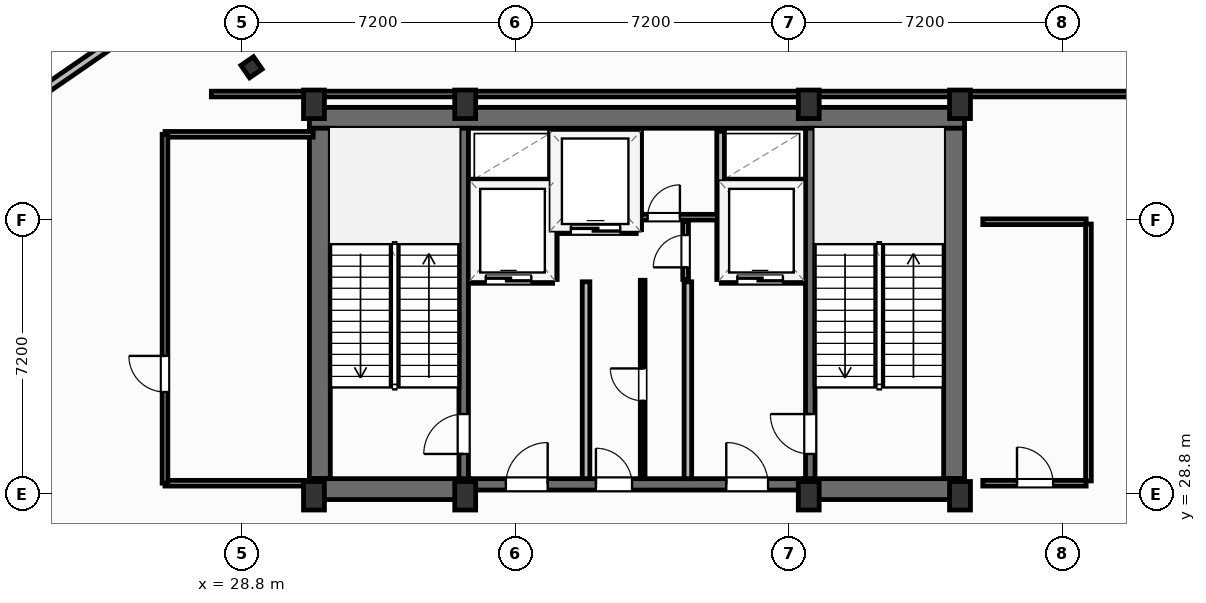
"""IFC4 building model, lengths in metres.
Left out: names, types, materials, properties, quantities, classifications, styles, units other than length and angle.
Written with IfcOpenShell. Run it as: python <this file> out.ifc"""

import sys

from ifc_helpers import new_model, si_unit, direction, frame, frame_2d, origin, origin_2d, place, context, subcontext, project, spatial, rectangle, i_section, extrude, element, fill, save


model = new_model("IFC4")
c1 = context("Model", 3, precision=1e-05, world=origin(), true_north=direction((0.0, 1.0)))
c2 = subcontext(c1, "Body", "Model", "MODEL_VIEW")
j1 = project(units=[si_unit("LENGTHUNIT", "METRE"), si_unit("PLANEANGLEUNIT", "RADIAN")], contexts=[c1])
p1 = place(None, origin())
s1 = spatial("IfcSite", under=j1, at=p1, CompositionType="ELEMENT")
p2 = place(p1, origin())
s2 = spatial("IfcBuilding", under=s1, at=p2, CompositionType="ELEMENT")
p3 = place(p2, frame((0.0, 0.0, 291.5)))
s3 = spatial("IfcBuildingStorey", under=s2, at=p3, CompositionType="ELEMENT", Elevation=291.5)
for number, where, z_axis, x_axis in (
    (1, (30.7, 28.75, 0.0), (0.0, 0.0, 1.0), (1.0, 0.0, 0.0)),
    (2, (34.68, 28.75, 0.0), (0.0, 0.0, 1.0), (1.0, 0.0, 0.0)),
    (3, (43.72, 28.75, 0.0), (0.0, 0.0, 1.0), (1.0, 0.0, 0.0)),
    (4, (47.7, 28.75, 0.0), (0.0, 0.0, 1.0), (1.0, 0.0, 0.0)),
    (5, (30.7, 39.05, 0.0), (0.0, 0.0, 1.0), (1.0, 0.0, 0.0)),
    (6, (34.68, 39.05, 0.0), (0.0, 0.0, 1.0), (1.0, 0.0, 0.0)),
    (7, (43.72, 39.05, 0.0), (0.0, 0.0, 1.0), (1.0, 0.0, 0.0)),
    (8, (47.7, 39.05, 0.0), (0.0, 0.0, 1.0), (1.0, 0.0, 0.0)),
):
    element("IfcColumn", number, at=place(p3, frame(where, z_axis=z_axis, x_axis=x_axis)), inside=s3, PredefinedType="COLUMN", context=c2, shape_type="SweptSolid", body=[
        extrude(rectangle(XDim=0.55, YDim=0.75, at=origin_2d()), origin(), (0.0, 0.0, 1.0), 4.8),
    ])
p4 = place(p3, frame((30.58, 38.695, 0.0), z_axis=(0.0, 0.0, 1.0), x_axis=(1.0, 0.0, 0.0)))
e9 = element("IfcWall", 9, at=p4, inside=s3, PredefinedType="SHEAR", context=c2, shape_type="SweptSolid", body=[
    extrude(rectangle(XDim=17.24, YDim=0.55, at=frame_2d((8.62, 0.0))), origin(), (0.0, 0.0, 1.0), 4.48),
])
for number, where, z_axis, x_axis in (
    (10, (30.855, 29.2, 0.0), (0.0, 0.0, 1.0), (0.0, 1.0, 0.0)),
    (11, (47.545, 29.2, 0.0), (0.0, 0.0, 1.0), (0.0, 1.0, 0.0)),
):
    element("IfcWall", number, at=place(p3, frame(where, z_axis=z_axis, x_axis=x_axis)), inside=s3, PredefinedType="SHEAR", context=c2, shape_type="SweptSolid", body=[
        extrude(rectangle(XDim=9.22, YDim=0.55, at=frame_2d((4.61, 0.0))), origin(), (0.0, 0.0, 1.0), 4.48),
    ])
for number, where, z_axis, x_axis in (
    (12, (30.58, 28.925, 0.0), (0.0, 0.0, 1.0), (1.0, 0.0, 0.0)),
    (13, (43.6, 28.925, 0.0), (0.0, 0.0, 1.0), (1.0, 0.0, 0.0)),
):
    element("IfcWall", number, at=place(p3, frame(where, z_axis=z_axis, x_axis=x_axis)), inside=s3, PredefinedType="SHEAR", context=c2, shape_type="SweptSolid", body=[
        extrude(rectangle(XDim=4.22, YDim=0.55, at=frame_2d((2.11, 0.0))), origin(), (0.0, 0.0, 1.0), 4.48),
    ])
p5 = place(p3, frame((34.8, 29.05, 0.0), z_axis=(0.0, 0.0, 1.0), x_axis=(1.0, 0.0, 0.0)))
e14 = element("IfcWall", 14, at=p5, inside=s3, PredefinedType="SHEAR", context=c2, shape_type="SweptSolid", body=[
    extrude(rectangle(XDim=8.8, YDim=0.3, at=frame_2d((4.4, 0.0))), origin(), (0.0, 0.0, 1.0), 4.48),
])
p6 = place(p5, frame((0.95, 0.0, 0.0)))
e15 = element("IfcOpeningElement", 15, at=p6, cuts=e14, PredefinedType="OPENING", context=c2, shape_type="SweptSolid", body=[
    extrude(rectangle(XDim=1.1, YDim=2.15, at=frame_2d((0.55, 1.075))), frame((0.0, 0.16, 0.0), z_axis=(0.0, -1.0, 0.0), x_axis=(1.0, 0.0, 0.0)), (0.0, 0.0, 1.0), 0.32),
])
p7 = place(p5, frame((6.75, 0.0, 0.0)))
e16 = element("IfcOpeningElement", 16, at=p7, cuts=e14, PredefinedType="OPENING", context=c2, shape_type="SweptSolid", body=[
    extrude(rectangle(XDim=1.1, YDim=2.15, at=frame_2d((0.55, 1.075))), frame((0.0, 0.16, 0.0), z_axis=(0.0, -1.0, 0.0), x_axis=(1.0, 0.0, 0.0)), (0.0, 0.0, 1.0), 0.32),
])
p8 = place(p5, frame((3.32, 0.0, 0.0)))
e17 = element("IfcOpeningElement", 17, at=p8, cuts=e14, PredefinedType="OPENING", context=c2, shape_type="SweptSolid", body=[
    extrude(rectangle(XDim=0.95, YDim=2.15, at=frame_2d((0.475, 1.075))), frame((0.0, 0.16, 0.0), z_axis=(0.0, -1.0, 0.0), x_axis=(1.0, 0.0, 0.0)), (0.0, 0.0, 1.0), 0.32),
])
p9 = place(p3, frame((34.64, 29.2, 0.0), z_axis=(0.0, 0.0, 1.0), x_axis=(0.0, 1.0, 0.0)))
e18 = element("IfcWall", 18, at=p9, inside=s3, PredefinedType="SHEAR", context=c2, shape_type="SweptSolid", body=[
    extrude(rectangle(XDim=9.22, YDim=0.25, at=frame_2d((4.61, 0.0))), origin(), (0.0, 0.0, 1.0), 4.48),
])
p10 = place(p9, frame((0.65, 0.0, 0.0)))
e19 = element("IfcOpeningElement", 19, at=p10, cuts=e18, PredefinedType="OPENING", context=c2, shape_type="SweptSolid", body=[
    extrude(rectangle(XDim=1.05, YDim=2.15, at=frame_2d((0.525, 1.075))), frame((0.0, 0.135, 0.0), z_axis=(0.0, -1.0, 0.0), x_axis=(1.0, 0.0, 0.0)), (0.0, 0.0, 1.0), 0.27),
])
p11 = place(p3, frame((43.76, 29.2, 0.0), z_axis=(0.0, 0.0, 1.0), x_axis=(0.0, 1.0, 0.0)))
e20 = element("IfcWall", 20, at=p11, inside=s3, PredefinedType="SHEAR", context=c2, shape_type="SweptSolid", body=[
    extrude(rectangle(XDim=9.22, YDim=0.25, at=frame_2d((4.61, 0.0))), origin(), (0.0, 0.0, 1.0), 4.48),
])
p12 = place(p11, frame((0.65, 0.0, 0.0)))
e21 = element("IfcOpeningElement", 21, at=p12, cuts=e20, PredefinedType="OPENING", context=c2, shape_type="SweptSolid", body=[
    extrude(rectangle(XDim=1.05, YDim=2.15, at=frame_2d((0.525, 1.075))), frame((0.0, 0.135, 0.0), z_axis=(0.0, -1.0, 0.0), x_axis=(1.0, 0.0, 0.0)), (0.0, 0.0, 1.0), 0.27),
])
p13 = place(p3, frame((29.057, 40.025, 0.0), z_axis=(0.0, 0.0, 1.0), x_axis=(0.823532597628, 0.567268949127, 0.0)))
e22 = element("IfcColumn", 22, at=p13, inside=s3, PredefinedType="COLUMN", context=c2, shape_type="SweptSolid", body=[
    extrude(i_section(OverallWidth=0.401, OverallDepth=0.399, WebThickness=0.025, FlangeThickness=0.04, FilletRadius=0.022, at=origin_2d()), origin(), (0.0, 0.0, 1.0), 4.8),
])
p14 = place(p3, frame((27.693, -7.489, 0.0), z_axis=(0.0, 0.0, 1.0), x_axis=(0.733009701217, 0.680218184057, 0.0)))
e23 = element("IfcWall", 23, at=p14, inside=s3, PredefinedType="SOLIDWALL", context=c2, shape_type="SweptSolid", body=[
    extrude(rectangle(XDim=66.428, YDim=0.22, at=frame_2d((33.214, 0.0))), origin(), (0.0, 0.0, 1.0), 2.265),
])
p15 = place(p14, frame((32.014, 0.0, 0.8)))
e24 = element("IfcOpeningElement", 24, at=p15, cuts=e23, PredefinedType="OPENING", context=c2, shape_type="SweptSolid", body=[
    extrude(rectangle(XDim=2.4, YDim=1.385, at=frame_2d((1.2, 0.692))), frame((0.0, 0.12, 0.0), z_axis=(0.0, -1.0, 0.0), x_axis=(1.0, 0.0, 0.0)), (0.0, 0.0, 1.0), 0.24),
])
p16 = place(p3, frame((50.695, 58.086, 0.0), z_axis=(0.0, 0.0, 1.0), x_axis=(-0.823531024939, -0.567271232272, 0.0)))
e25 = element("IfcWall", 25, at=p16, inside=s3, PredefinedType="SOLIDWALL", context=c2, shape_type="SweptSolid", body=[
    extrude(rectangle(XDim=56.157, YDim=0.22, at=frame_2d((28.079, 0.0))), origin(), (0.0, 0.0, 1.0), 3.76),
])
p17 = place(p16, frame((26.879, 0.0, 0.8)))
e26 = element("IfcOpeningElement", 26, at=p17, cuts=e25, PredefinedType="OPENING", context=c2, shape_type="SweptSolid", body=[
    extrude(rectangle(XDim=2.4, YDim=1.85, at=frame_2d((1.2, 0.925))), frame((0.0, 0.12, 0.0), z_axis=(0.0, -1.0, 0.0), x_axis=(1.0, 0.0, 0.0)), (0.0, 0.0, 1.0), 0.24),
])
p18 = place(p3, frame((28.0, 39.32, 0.0), z_axis=(0.0, 0.0, 1.0), x_axis=(1.0, 0.0, 0.0)))
e27 = element("IfcWall", 27, at=p18, inside=s3, PredefinedType="PARTITIONING", context=c2, shape_type="SweptSolid", body=[
    extrude(rectangle(XDim=28.45, YDim=0.15, at=frame_2d((14.225, 0.0))), origin(), (0.0, 0.0, 1.0), 4.48),
])
p19 = place(p18, frame((24.6, 0.0, 0.0)))
e28 = element("IfcOpeningElement", 28, at=p19, cuts=e27, PredefinedType="OPENING", context=c2, shape_type="SweptSolid", body=[
    extrude(rectangle(XDim=1.0, YDim=2.05, at=frame_2d((0.5, 1.025))), frame((0.0, 0.085, 0.0), z_axis=(0.0, -1.0, 0.0), x_axis=(1.0, 0.0, 0.0)), (0.0, 0.0, 1.0), 0.17),
])
for number, where, z_axis, x_axis in (
    (29, (37.86, 29.2, 0.0), (0.0, 0.0, 1.0), (0.0, 1.0, 0.0)),
    (30, (40.54, 29.2, 0.0), (0.0, 0.0, 1.0), (0.0, 1.0, 0.0)),
):
    element("IfcWall", number, at=place(p3, frame(where, z_axis=z_axis, x_axis=x_axis)), inside=s3, PredefinedType="PARTITIONING", context=c2, shape_type="SweptSolid", body=[
        extrude(rectangle(XDim=5.18, YDim=0.2, at=frame_2d((2.59, 0.0))), origin(), (0.0, 0.0, 1.0), 4.48),
    ])
p20 = place(p3, frame((34.8, 34.44, 0.0), z_axis=(0.0, 0.0, 1.0), x_axis=(1.0, 0.0, 0.0)))
e31 = element("IfcWall", 31, at=p20, inside=s3, PredefinedType="PARTITIONING", context=c2, shape_type="SweptSolid", body=[
    extrude(rectangle(XDim=2.18, YDim=0.2, at=frame_2d((1.09, 0.0))), origin(), (0.0, 0.0, 1.0), 4.48),
])
p21 = place(p20, frame((0.42, 0.0, 0.0)))
e32 = element("IfcOpeningElement", 32, at=p21, cuts=e31, PredefinedType="OPENING", context=c2, shape_type="SweptSolid", body=[
    extrude(rectangle(XDim=1.2, YDim=2.2, at=frame_2d((0.6, 1.1))), frame((0.0, 0.11, 0.0), z_axis=(0.0, -1.0, 0.0), x_axis=(1.0, 0.0, 0.0)), (0.0, 0.0, 1.0), 0.22),
])
p22 = place(p3, frame((34.8, 36.98, 0.0), z_axis=(0.0, 0.0, 1.0), x_axis=(1.0, 0.0, 0.0)))
e33 = element("IfcWall", 33, at=p22, inside=s3, PredefinedType="PARTITIONING", context=c2, shape_type="SweptSolid", body=[
    extrude(rectangle(XDim=2.18, YDim=0.2, at=frame_2d((1.09, 0.0))), origin(), (0.0, 0.0, 1.0), 4.48),
])
p23 = place(p3, frame((37.0, 34.44, 0.0), z_axis=(0.0, 0.0, 1.0), x_axis=(0.0, 1.0, 0.0)))
e34 = element("IfcWall", 34, at=p23, inside=s3, PredefinedType="PARTITIONING", context=c2, shape_type="SweptSolid", body=[
    extrude(rectangle(XDim=3.9, YDim=0.2, at=frame_2d((1.95, 0.0))), origin(), (0.0, 0.0, 1.0), 4.48),
])
p24 = place(p3, frame((41.42, 34.44, 0.0), z_axis=(0.0, 0.0, 1.0), x_axis=(1.0, 0.0, 0.0)))
e35 = element("IfcWall", 35, at=p24, inside=s3, PredefinedType="PARTITIONING", context=c2, shape_type="SweptSolid", body=[
    extrude(rectangle(XDim=2.18, YDim=0.2, at=frame_2d((1.09, 0.0))), origin(), (0.0, 0.0, 1.0), 4.48),
])
p25 = place(p24, frame((0.42, 0.0, 0.0)))
e36 = element("IfcOpeningElement", 36, at=p25, cuts=e35, PredefinedType="OPENING", context=c2, shape_type="SweptSolid", body=[
    extrude(rectangle(XDim=1.2, YDim=2.2, at=frame_2d((0.6, 1.1))), frame((0.0, 0.11, 0.0), z_axis=(0.0, -1.0, 0.0), x_axis=(1.0, 0.0, 0.0)), (0.0, 0.0, 1.0), 0.22),
])
p26 = place(p3, frame((41.42, 36.98, 0.0), z_axis=(0.0, 0.0, 1.0), x_axis=(1.0, 0.0, 0.0)))
e37 = element("IfcWall", 37, at=p26, inside=s3, PredefinedType="PARTITIONING", context=c2, shape_type="SweptSolid", body=[
    extrude(rectangle(XDim=2.18, YDim=0.2, at=frame_2d((1.09, 0.0))), origin(), (0.0, 0.0, 1.0), 4.48),
])
p27 = place(p3, frame((41.4, 34.44, 0.0), z_axis=(0.0, 0.0, 1.0), x_axis=(0.0, 1.0, 0.0)))
e38 = element("IfcWall", 38, at=p27, inside=s3, PredefinedType="PARTITIONING", context=c2, shape_type="SweptSolid", body=[
    extrude(rectangle(XDim=3.9, YDim=0.2, at=frame_2d((1.95, 0.0))), origin(), (0.0, 0.0, 1.0), 4.48),
])
p28 = place(p3, frame((37.06, 35.75, 0.0), z_axis=(0.0, 0.0, 1.0), x_axis=(1.0, 0.0, 0.0)))
e39 = element("IfcWall", 39, at=p28, inside=s3, PredefinedType="PARTITIONING", context=c2, shape_type="SweptSolid", body=[
    extrude(rectangle(XDim=2.12, YDim=0.2, at=frame_2d((1.06, 0.0))), origin(), (0.0, 0.0, 1.0), 4.48),
])
p29 = place(p28, frame((0.4, 0.0, 0.0)))
e40 = element("IfcOpeningElement", 40, at=p29, cuts=e39, PredefinedType="OPENING", context=c2, shape_type="SweptSolid", body=[
    extrude(rectangle(XDim=1.3, YDim=2.2, at=frame_2d((0.65, 1.1))), frame((0.0, 0.11, 0.0), z_axis=(0.0, -1.0, 0.0), x_axis=(1.0, 0.0, 0.0)), (0.0, 0.0, 1.0), 0.22),
])
p30 = place(p3, frame((39.22, 35.75, 0.0), z_axis=(0.0, 0.0, 1.0), x_axis=(0.0, 1.0, 0.0)))
e41 = element("IfcWall", 41, at=p30, inside=s3, PredefinedType="PARTITIONING", context=c2, shape_type="SweptSolid", body=[
    extrude(rectangle(XDim=2.59, YDim=0.2, at=frame_2d((1.295, 0.0))), origin(), (0.0, 0.0, 1.0), 4.48),
])
p31 = place(p3, frame((39.3, 36.08, 0.0), z_axis=(0.0, 0.0, 1.0), x_axis=(1.0, 0.0, 0.0)))
e42 = element("IfcWall", 42, at=p31, inside=s3, PredefinedType="PARTITIONING", context=c2, shape_type="SweptSolid", body=[
    extrude(rectangle(XDim=2.02, YDim=0.15, at=frame_2d((1.01, 0.0))), origin(), (0.0, 0.0, 1.0), 4.48),
])
p32 = place(p31, frame((0.18, 0.0, 0.0)))
e43 = element("IfcOpeningElement", 43, at=p32, cuts=e42, PredefinedType="OPENING", context=c2, shape_type="SweptSolid", body=[
    extrude(rectangle(XDim=0.85, YDim=2.05, at=frame_2d((0.425, 1.025))), frame((0.0, 0.085, 0.0), z_axis=(0.0, -1.0, 0.0), x_axis=(1.0, 0.0, 0.0)), (0.0, 0.0, 1.0), 0.17),
])
p33 = place(p3, frame((40.48, 34.44, 0.0), z_axis=(0.0, 0.0, 1.0), x_axis=(0.0, 1.0, 0.0)))
e44 = element("IfcWall", 44, at=p33, inside=s3, PredefinedType="PARTITIONING", context=c2, shape_type="SweptSolid", body=[
    extrude(rectangle(XDim=1.52, YDim=0.15, at=frame_2d((0.76, 0.0))), origin(), (0.0, 0.0, 1.0), 4.48),
])
p34 = place(p33, frame((0.32, 0.0, 0.0)))
e45 = element("IfcOpeningElement", 45, at=p34, cuts=e44, PredefinedType="OPENING", context=c2, shape_type="SweptSolid", body=[
    extrude(rectangle(XDim=0.85, YDim=2.05, at=frame_2d((0.425, 1.025))), frame((0.0, 0.085, 0.0), z_axis=(0.0, -1.0, 0.0), x_axis=(1.0, 0.0, 0.0)), (0.0, 0.0, 1.0), 0.17),
])
p35 = place(p3, frame((39.35, 29.2, 0.0), z_axis=(0.0, 0.0, 1.0), x_axis=(0.0, 1.0, 0.0)))
e46 = element("IfcWall", 46, at=p35, inside=s3, PredefinedType="PARTITIONING", context=c2, shape_type="SweptSolid", body=[
    extrude(rectangle(XDim=5.22, YDim=0.125, at=frame_2d((2.61, 0.0))), origin(), (0.0, 0.0, 1.0), 4.48),
])
p36 = place(p35, frame((2.05, 0.0, 0.0)))
e47 = element("IfcOpeningElement", 47, at=p36, cuts=e46, PredefinedType="OPENING", context=c2, shape_type="SweptSolid", body=[
    extrude(rectangle(XDim=0.85, YDim=2.05, at=frame_2d((0.425, 1.025))), frame((0.0, 0.073, 0.0), z_axis=(0.0, -1.0, 0.0), x_axis=(1.0, 0.0, 0.0)), (0.0, 0.0, 1.0), 0.145),
])
p37 = place(p3, frame((26.78, 29.08, 0.0), z_axis=(0.0, 0.0, 1.0), x_axis=(1.0, 0.0, 0.0)))
e48 = element("IfcWall", 48, at=p37, inside=s3, PredefinedType="PARTITIONING", context=c2, shape_type="SweptSolid", body=[
    extrude(rectangle(XDim=3.8, YDim=0.15, at=frame_2d((1.9, 0.0))), origin(), (0.0, 0.0, 1.0), 4.48),
])
p38 = place(p3, frame((26.78, 38.26, 0.0), z_axis=(0.0, 0.0, 1.0), x_axis=(1.0, 0.0, 0.0)))
e49 = element("IfcWall", 49, at=p38, inside=s3, PredefinedType="PARTITIONING", context=c2, shape_type="SweptSolid", body=[
    extrude(rectangle(XDim=3.9, YDim=0.15, at=frame_2d((1.95, 0.0))), origin(), (0.0, 0.0, 1.0), 4.48),
])
p39 = place(p3, frame((26.78, 29.08, 0.0), z_axis=(0.0, 0.0, 1.0), x_axis=(0.0, 1.0, 0.0)))
e50 = element("IfcWall", 50, at=p39, inside=s3, PredefinedType="PARTITIONING", context=c2, shape_type="SweptSolid", body=[
    extrude(rectangle(XDim=9.18, YDim=0.15, at=frame_2d((4.59, 0.0))), origin(), (0.0, 0.0, 1.0), 4.48),
])
p40 = place(p39, frame((2.4, 0.0, 0.0)))
e51 = element("IfcOpeningElement", 51, at=p40, cuts=e50, PredefinedType="OPENING", context=c2, shape_type="SweptSolid", body=[
    extrude(rectangle(XDim=0.95, YDim=2.05, at=frame_2d((0.475, 1.025))), frame((0.0, 0.085, 0.0), z_axis=(0.0, -1.0, 0.0), x_axis=(1.0, 0.0, 0.0)), (0.0, 0.0, 1.0), 0.17),
])
p41 = place(p3, frame((48.3, 29.08, 0.0), z_axis=(0.0, 0.0, 1.0), x_axis=(1.0, 0.0, 0.0)))
e52 = element("IfcWall", 52, at=p41, inside=s3, PredefinedType="PARTITIONING", context=c2, shape_type="SweptSolid", body=[
    extrude(rectangle(XDim=2.72, YDim=0.15, at=frame_2d((1.36, 0.0))), origin(), (0.0, 0.0, 1.0), 3.692),
])
p42 = place(p41, frame((0.9, 0.0, 0.0)))
e53 = element("IfcOpeningElement", 53, at=p42, cuts=e52, PredefinedType="OPENING", context=c2, shape_type="SweptSolid", body=[
    extrude(rectangle(XDim=0.95, YDim=2.05, at=frame_2d((0.475, 1.025))), frame((0.0, 0.085, 0.0), z_axis=(0.0, -1.0, 0.0), x_axis=(1.0, 0.0, 0.0)), (0.0, 0.0, 1.0), 0.17),
])
p43 = place(p3, frame((48.3, 35.96, 0.0), z_axis=(0.0, 0.0, 1.0), x_axis=(1.0, 0.0, 0.0)))
e54 = element("IfcWall", 54, at=p43, inside=s3, PredefinedType="PARTITIONING", context=c2, shape_type="SweptSolid", body=[
    extrude(rectangle(XDim=2.72, YDim=0.15, at=frame_2d((1.36, 0.0))), origin(), (0.0, 0.0, 1.0), 4.48),
])
p44 = place(p3, frame((51.08, 29.14, 0.0), z_axis=(0.0, 0.0, 1.0), x_axis=(0.0, 1.0, 0.0)))
e55 = element("IfcWall", 55, at=p44, inside=s3, PredefinedType="PARTITIONING", context=c2, shape_type="SweptSolid", body=[
    extrude(rectangle(XDim=6.76, YDim=0.15, at=frame_2d((3.38, 0.0))), origin(), (0.0, 0.0, 1.0), 4.48),
])
p45 = place(p10, origin())
e56 = element("IfcDoor", 56, at=p45, inside=s3, OperationType="SINGLE_SWING_LEFT", PredefinedType="DOOR", context=c2, shape_type="SweptSolid", body=[
    extrude(rectangle(XDim=1.05, YDim=2.15, at=frame_2d((0.525, 1.075))), frame((0.0, 0.025, 0.0), z_axis=(0.0, -1.0, 0.0), x_axis=(1.0, 0.0, 0.0)), (0.0, 0.0, 1.0), 0.05),
])
fill(e19, e56)
p46 = place(p12, origin())
e57 = element("IfcDoor", 57, at=p46, inside=s3, OperationType="SINGLE_SWING_RIGHT", PredefinedType="DOOR", context=c2, shape_type="SweptSolid", body=[
    extrude(rectangle(XDim=1.05, YDim=2.15, at=frame_2d((0.525, 1.075))), frame((0.0, 0.025, 0.0), z_axis=(0.0, -1.0, 0.0), x_axis=(1.0, 0.0, 0.0)), (0.0, 0.0, 1.0), 0.05),
])
fill(e21, e57)
p47 = place(p6, origin())
e58 = element("IfcDoor", 58, at=p47, inside=s3, OperationType="SINGLE_SWING_RIGHT", PredefinedType="DOOR", context=c2, shape_type="SweptSolid", body=[
    extrude(rectangle(XDim=1.1, YDim=2.15, at=frame_2d((0.55, 1.075))), frame((0.0, 0.025, 0.0), z_axis=(0.0, -1.0, 0.0), x_axis=(1.0, 0.0, 0.0)), (0.0, 0.0, 1.0), 0.05),
])
fill(e15, e58)
p48 = place(p7, origin())
e59 = element("IfcDoor", 59, at=p48, inside=s3, OperationType="SINGLE_SWING_LEFT", PredefinedType="DOOR", context=c2, shape_type="SweptSolid", body=[
    extrude(rectangle(XDim=1.1, YDim=2.15, at=frame_2d((0.55, 1.075))), frame((0.0, 0.025, 0.0), z_axis=(0.0, -1.0, 0.0), x_axis=(1.0, 0.0, 0.0)), (0.0, 0.0, 1.0), 0.05),
])
fill(e16, e59)
p49 = place(p21, origin())
e60 = element("IfcDoor", 60, at=p49, inside=s3, OperationType="SLIDING_TO_LEFT", PredefinedType="DOOR", context=c2, shape_type="SweptSolid", body=[
    extrude(rectangle(XDim=1.2, YDim=2.2, at=frame_2d((0.6, 1.1))), frame((0.0, 0.025, 0.0), z_axis=(0.0, -1.0, 0.0), x_axis=(1.0, 0.0, 0.0)), (0.0, 0.0, 1.0), 0.05),
])
fill(e32, e60)
p50 = place(p25, origin())
e61 = element("IfcDoor", 61, at=p50, inside=s3, OperationType="SLIDING_TO_LEFT", PredefinedType="DOOR", context=c2, shape_type="SweptSolid", body=[
    extrude(rectangle(XDim=1.2, YDim=2.2, at=frame_2d((0.6, 1.1))), frame((0.0, 0.025, 0.0), z_axis=(0.0, -1.0, 0.0), x_axis=(1.0, 0.0, 0.0)), (0.0, 0.0, 1.0), 0.05),
])
fill(e36, e61)
p51 = place(p29, origin())
e62 = element("IfcDoor", 62, at=p51, inside=s3, OperationType="SLIDING_TO_LEFT", PredefinedType="DOOR", context=c2, shape_type="SweptSolid", body=[
    extrude(rectangle(XDim=1.3, YDim=2.2, at=frame_2d((0.65, 1.1))), frame((0.0, 0.025, 0.0), z_axis=(0.0, -1.0, 0.0), x_axis=(1.0, 0.0, 0.0)), (0.0, 0.0, 1.0), 0.05),
])
fill(e40, e62)
p52 = place(p32, origin())
e63 = element("IfcDoor", 63, at=p52, inside=s3, OperationType="SINGLE_SWING_RIGHT", PredefinedType="DOOR", context=c2, shape_type="SweptSolid", body=[
    extrude(rectangle(XDim=0.85, YDim=2.05, at=frame_2d((0.425, 1.025))), frame((0.0, 0.025, 0.0), z_axis=(0.0, -1.0, 0.0), x_axis=(1.0, 0.0, 0.0)), (0.0, 0.0, 1.0), 0.05),
])
fill(e43, e63)
p53 = place(p34, origin())
e64 = element("IfcDoor", 64, at=p53, inside=s3, OperationType="SINGLE_SWING_LEFT", PredefinedType="DOOR", context=c2, shape_type="SweptSolid", body=[
    extrude(rectangle(XDim=0.85, YDim=2.05, at=frame_2d((0.425, 1.025))), frame((0.0, 0.025, 0.0), z_axis=(0.0, -1.0, 0.0), x_axis=(1.0, 0.0, 0.0)), (0.0, 0.0, 1.0), 0.05),
])
fill(e45, e64)
p54 = place(p36, origin())
e65 = element("IfcDoor", 65, at=p54, inside=s3, OperationType="SINGLE_SWING_RIGHT", PredefinedType="DOOR", context=c2, shape_type="SweptSolid", body=[
    extrude(rectangle(XDim=0.85, YDim=2.05, at=frame_2d((0.425, 1.025))), frame((0.0, 0.025, 0.0), z_axis=(0.0, -1.0, 0.0), x_axis=(1.0, 0.0, 0.0)), (0.0, 0.0, 1.0), 0.05),
])
fill(e47, e65)
p55 = place(p8, origin())
e66 = element("IfcDoor", 66, at=p55, inside=s3, OperationType="SINGLE_SWING_LEFT", PredefinedType="DOOR", context=c2, shape_type="SweptSolid", body=[
    extrude(rectangle(XDim=0.95, YDim=2.15, at=frame_2d((0.475, 1.075))), frame((0.0, 0.025, 0.0), z_axis=(0.0, -1.0, 0.0), x_axis=(1.0, 0.0, 0.0)), (0.0, 0.0, 1.0), 0.05),
])
fill(e17, e66)
p56 = place(p40, origin())
e67 = element("IfcDoor", 67, at=p56, inside=s3, OperationType="SINGLE_SWING_RIGHT", PredefinedType="DOOR", context=c2, shape_type="SweptSolid", body=[
    extrude(rectangle(XDim=0.95, YDim=2.05, at=frame_2d((0.475, 1.025))), frame((0.0, 0.025, 0.0), z_axis=(0.0, -1.0, 0.0), x_axis=(1.0, 0.0, 0.0)), (0.0, 0.0, 1.0), 0.05),
])
fill(e51, e67)
p57 = place(p42, origin())
e68 = element("IfcDoor", 68, at=p57, inside=s3, OperationType="SINGLE_SWING_LEFT", PredefinedType="DOOR", context=c2, shape_type="SweptSolid", body=[
    extrude(rectangle(XDim=0.95, YDim=2.05, at=frame_2d((0.475, 1.025))), frame((0.0, 0.025, 0.0), z_axis=(0.0, -1.0, 0.0), x_axis=(1.0, 0.0, 0.0)), (0.0, 0.0, 1.0), 0.05),
])
fill(e53, e68)
save(model, sys.argv[1])
